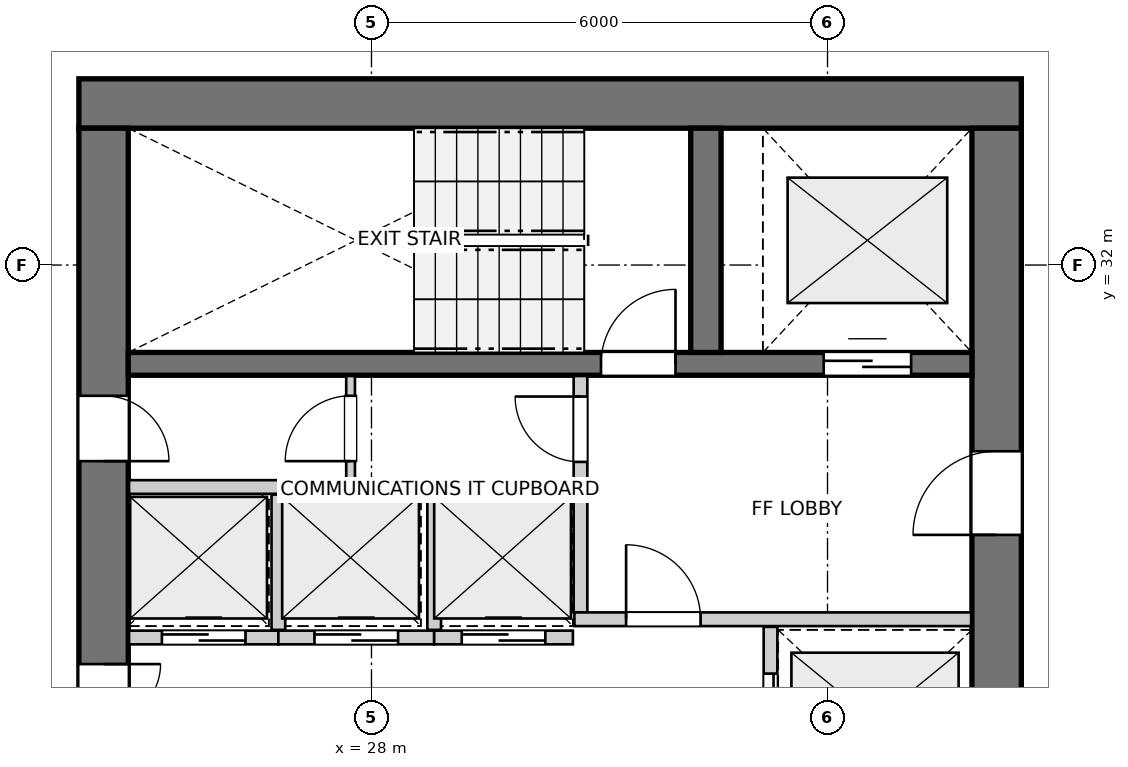
"""IFC4 building model, lengths in metres.
Left out: names, types, materials, properties, quantities, classifications, styles, units other than length and angle.
Written with IfcOpenShell. Run it as: python <this file> out.ifc"""

import sys

from ifc_helpers import new_model, si_unit, direction, frame, frame_2d, origin, place, context, subcontext, project, spatial, rectangle, extrude, source, transform, mapped, element, fill, save


model = new_model("IFC4")
c1 = context("Model", 3, precision=1e-05, world=origin(), true_north=direction((0.0, 1.0)))
c2 = subcontext(c1, "Body", "Model", "MODEL_VIEW")
j1 = project(units=[si_unit("LENGTHUNIT", "METRE"), si_unit("PLANEANGLEUNIT", "RADIAN")], contexts=[c1])
p1 = place(None, origin())
s1 = spatial("IfcSite", under=j1, at=p1, CompositionType="ELEMENT")
p2 = place(p1, origin())
s2 = spatial("IfcBuilding", under=s1, at=p2, CompositionType="ELEMENT")
p3 = place(p2, frame((0.0, 0.0, 145.8)))
s3 = spatial("IfcBuildingStorey", under=s2, at=p3, CompositionType="ELEMENT", Elevation=145.8)
p4 = place(p3, frame((36.55, 34.125, 0.0), z_axis=(0.0, 0.0, 1.0), x_axis=(-1.0, 0.0, 0.0)))
e1 = element("IfcWall", 1, at=p4, inside=s3, PredefinedType="SHEAR", context=c2, shape_type="SweptSolid", body=[
    extrude(rectangle(XDim=12.4, YDim=0.65, at=frame_2d((6.2, 0.0))), origin(), (0.0, 0.0, 1.0), 2.95),
])
p5 = place(p3, frame((24.475, 33.8, 0.0), z_axis=(0.0, 0.0, 1.0), x_axis=(0.0, -1.0, 0.0)))
e2 = element("IfcWall", 2, at=p5, inside=s3, PredefinedType="SHEAR", context=c2, shape_type="SweptSolid", body=[
    extrude(rectangle(XDim=15.6, YDim=0.65, at=frame_2d((7.8, 0.0))), origin(), (0.0, 0.0, 1.0), 2.95),
])
p6 = place(p5, frame((7.05, 0.0, 0.0)))
e3 = element("IfcOpeningElement", 3, at=p6, cuts=e2, PredefinedType="OPENING", context=c2, shape_type="SweptSolid", body=[
    extrude(rectangle(XDim=1.5, YDim=2.15, at=frame_2d((0.75, 1.075))), frame((0.0, 0.335, 0.0), z_axis=(0.0, -1.0, 0.0), x_axis=(1.0, 0.0, 0.0)), (0.0, 0.0, 1.0), 0.67),
])
p7 = place(p5, frame((3.52, 0.0, 0.0)))
e4 = element("IfcOpeningElement", 4, at=p7, cuts=e2, PredefinedType="OPENING", context=c2, shape_type="SweptSolid", body=[
    extrude(rectangle(XDim=0.86, YDim=2.05, at=frame_2d((0.43, 1.025))), frame((0.0, 0.335, 0.0), z_axis=(0.0, -1.0, 0.0), x_axis=(1.0, 0.0, 0.0)), (0.0, 0.0, 1.0), 0.67),
])
p8 = place(p5, frame((11.22, 0.0, 0.0)))
e5 = element("IfcOpeningElement", 5, at=p8, cuts=e2, PredefinedType="OPENING", context=c2, shape_type="SweptSolid", body=[
    extrude(rectangle(XDim=0.86, YDim=2.05, at=frame_2d((0.43, 1.025))), frame((0.0, 0.335, 0.0), z_axis=(0.0, -1.0, 0.0), x_axis=(1.0, 0.0, 0.0)), (0.0, 0.0, 1.0), 0.67),
])
p9 = place(p3, frame((36.225, 18.2, 0.0), z_axis=(0.0, 0.0, 1.0), x_axis=(0.0, 1.0, 0.0)))
e6 = element("IfcWall", 6, at=p9, inside=s3, PredefinedType="SHEAR", context=c2, shape_type="SweptSolid", body=[
    extrude(rectangle(XDim=15.6, YDim=0.65, at=frame_2d((7.8, 0.0))), origin(), (0.0, 0.0, 1.0), 2.95),
])
p10 = place(p9, frame((4.25, 0.0, 0.0)))
e7 = element("IfcOpeningElement", 7, at=p10, cuts=e6, PredefinedType="OPENING", context=c2, shape_type="SweptSolid", body=[
    extrude(rectangle(XDim=1.1, YDim=2.15, at=frame_2d((0.55, 1.075))), frame((0.0, 0.335, 0.0), z_axis=(0.0, -1.0, 0.0), x_axis=(1.0, 0.0, 0.0)), (0.0, 0.0, 1.0), 0.67),
])
p11 = place(p9, frame((10.25, 0.0, 0.0)))
e8 = element("IfcOpeningElement", 8, at=p11, cuts=e6, PredefinedType="OPENING", context=c2, shape_type="SweptSolid", body=[
    extrude(rectangle(XDim=1.1, YDim=2.15, at=frame_2d((0.55, 1.075))), frame((0.0, 0.335, 0.0), z_axis=(0.0, -1.0, 0.0), x_axis=(1.0, 0.0, 0.0)), (0.0, 0.0, 1.0), 0.67),
])
p12 = place(p3, frame((24.8, 30.7, 0.0), z_axis=(0.0, 0.0, 1.0), x_axis=(1.0, 0.0, 0.0)))
e9 = element("IfcWall", 9, at=p12, inside=s3, PredefinedType="SHEAR", context=c2, shape_type="SweptSolid", body=[
    extrude(rectangle(XDim=11.1, YDim=0.3, at=frame_2d((5.55, 0.0))), origin(), (0.0, 0.0, 1.0), 2.95),
])
p13 = place(p12, frame((6.22, 0.0, 0.0)))
e10 = element("IfcOpeningElement", 10, at=p13, cuts=e9, PredefinedType="OPENING", context=c2, shape_type="SweptSolid", body=[
    extrude(rectangle(XDim=0.98, YDim=2.15, at=frame_2d((0.49, 1.075))), frame((0.0, 0.16, 0.0), z_axis=(0.0, -1.0, 0.0), x_axis=(1.0, 0.0, 0.0)), (0.0, 0.0, 1.0), 0.32),
])
p14 = place(p12, frame((9.15, 0.0, 0.0)))
e11 = element("IfcOpeningElement", 11, at=p14, cuts=e9, PredefinedType="OPENING", context=c2, shape_type="SweptSolid", body=[
    extrude(rectangle(XDim=1.15, YDim=2.15, at=frame_2d((0.575, 1.075))), frame((0.0, 0.16, 0.0), z_axis=(0.0, -1.0, 0.0), x_axis=(1.0, 0.0, 0.0)), (0.0, 0.0, 1.0), 0.32),
])
p15 = place(p3, frame((32.4, 30.85, 0.0), z_axis=(0.0, 0.0, 1.0), x_axis=(0.0, 1.0, 0.0)))
e12 = element("IfcWall", 12, at=p15, inside=s3, PredefinedType="SHEAR", context=c2, shape_type="SweptSolid", body=[
    extrude(rectangle(XDim=2.95, YDim=0.4, at=frame_2d((1.475, 0.0))), origin(), (0.0, 0.0, 1.0), 2.95),
])
p16 = place(p3, frame((30.75, 27.43, 0.0), z_axis=(0.0, 0.0, 1.0), x_axis=(0.0, 1.0, 0.0)))
e13 = element("IfcWall", 13, at=p16, inside=s3, PredefinedType="PARTITIONING", context=c2, shape_type="SweptSolid", body=[
    extrude(rectangle(XDim=3.11, YDim=0.18, at=frame_2d((1.555, 0.0))), origin(), (0.0, 0.0, 1.0), 2.95),
])
p17 = place(p16, frame((1.98, 0.0, 0.0)))
e14 = element("IfcOpeningElement", 14, at=p17, cuts=e13, PredefinedType="OPENING", context=c2, shape_type="SweptSolid", body=[
    extrude(rectangle(XDim=0.86, YDim=2.05, at=frame_2d((0.43, 1.025))), frame((0.0, 0.1, 0.0), z_axis=(0.0, -1.0, 0.0), x_axis=(1.0, 0.0, 0.0)), (0.0, 0.0, 1.0), 0.2),
])
p18 = place(p3, frame((30.67, 27.34, 0.0), z_axis=(0.0, 0.0, 1.0), x_axis=(1.0, 0.0, 0.0)))
e15 = element("IfcWall", 15, at=p18, inside=s3, PredefinedType="PARTITIONING", context=c2, shape_type="SweptSolid", body=[
    extrude(rectangle(XDim=5.22, YDim=0.18, at=frame_2d((2.61, 0.0))), origin(), (0.0, 0.0, 1.0), 2.95),
])
p19 = place(p18, frame((0.68, 0.0, 0.0)))
e16 = element("IfcOpeningElement", 16, at=p19, cuts=e15, PredefinedType="OPENING", context=c2, shape_type="SweptSolid", body=[
    extrude(rectangle(XDim=0.98, YDim=2.15, at=frame_2d((0.49, 1.075))), frame((0.0, 0.1, 0.0), z_axis=(0.0, -1.0, 0.0), x_axis=(1.0, 0.0, 0.0)), (0.0, 0.0, 1.0), 0.2),
])
p20 = place(p3, frame((33.25, 24.76, 0.0), z_axis=(0.0, 0.0, 1.0), x_axis=(0.0, 1.0, 0.0)))
e17 = element("IfcWall", 17, at=p20, inside=s3, PredefinedType="PARTITIONING", context=c2, shape_type="SweptSolid", body=[
    extrude(rectangle(XDim=2.48, YDim=0.18, at=frame_2d((1.24, 0.0))), origin(), (0.0, 0.0, 1.0), 2.95),
])
p21 = place(p20, frame((0.615, 0.0, 0.0)))
e18 = element("IfcOpeningElement", 18, at=p21, cuts=e17, PredefinedType="OPENING", context=c2, shape_type="SweptSolid", body=[
    extrude(rectangle(XDim=1.25, YDim=2.15, at=frame_2d((0.625, 1.075))), frame((0.0, 0.1, 0.0), z_axis=(0.0, -1.0, 0.0), x_axis=(1.0, 0.0, 0.0)), (0.0, 0.0, 1.0), 0.2),
])
p22 = place(p3, frame((24.81, 29.08, 0.0), z_axis=(0.0, 0.0, 1.0), x_axis=(1.0, 0.0, 0.0)))
e19 = element("IfcWall", 19, at=p22, inside=s3, PredefinedType="PARTITIONING", context=c2, shape_type="SweptSolid", body=[
    extrude(rectangle(XDim=5.84, YDim=0.18, at=frame_2d((2.92, 0.0))), origin(), (0.0, 0.0, 1.0), 2.95),
])
p23 = place(p3, frame((24.81, 27.1, 0.0), z_axis=(0.0, 0.0, 1.0), x_axis=(1.0, 0.0, 0.0)))
e20 = element("IfcWall", 20, at=p23, inside=s3, PredefinedType="PARTITIONING", context=c2, shape_type="SweptSolid", body=[
    extrude(rectangle(XDim=1.965, YDim=0.18, at=frame_2d((0.982, 0.0))), origin(), (0.0, 0.0, 1.0), 2.95),
])
p24 = place(p23, frame((0.433, 0.0, 0.0)))
e21 = element("IfcOpeningElement", 21, at=p24, cuts=e20, PredefinedType="OPENING", context=c2, shape_type="SweptSolid", body=[
    extrude(rectangle(XDim=1.1, YDim=2.15, at=frame_2d((0.55, 1.075))), frame((0.0, 0.1, 0.0), z_axis=(0.0, -1.0, 0.0), x_axis=(1.0, 0.0, 0.0)), (0.0, 0.0, 1.0), 0.2),
])
p25 = place(p3, frame((26.775, 27.1, 0.0), z_axis=(0.0, 0.0, 1.0), x_axis=(1.0, 0.0, 0.0)))
e22 = element("IfcWall", 22, at=p25, inside=s3, PredefinedType="PARTITIONING", context=c2, shape_type="SweptSolid", body=[
    extrude(rectangle(XDim=2.05, YDim=0.18, at=frame_2d((1.025, 0.0))), origin(), (0.0, 0.0, 1.0), 2.95),
])
p26 = place(p25, frame((0.475, 0.0, 0.0)))
e23 = element("IfcOpeningElement", 23, at=p26, cuts=e22, PredefinedType="OPENING", context=c2, shape_type="SweptSolid", body=[
    extrude(rectangle(XDim=1.1, YDim=2.15, at=frame_2d((0.55, 1.075))), frame((0.0, 0.1, 0.0), z_axis=(0.0, -1.0, 0.0), x_axis=(1.0, 0.0, 0.0)), (0.0, 0.0, 1.0), 0.2),
])
p27 = place(p3, frame((26.775, 27.2, 0.0), z_axis=(0.0, 0.0, 1.0), x_axis=(0.0, 1.0, 0.0)))
e24 = element("IfcWall", 24, at=p27, inside=s3, PredefinedType="PARTITIONING", context=c2, shape_type="SweptSolid", body=[
    extrude(rectangle(XDim=1.78, YDim=0.18, at=frame_2d((0.89, 0.0))), origin(), (0.0, 0.0, 1.0), 2.95),
])
p28 = place(p3, frame((28.825, 27.1, 0.0), z_axis=(0.0, 0.0, 1.0), x_axis=(1.0, 0.0, 0.0)))
e25 = element("IfcWall", 25, at=p28, inside=s3, PredefinedType="PARTITIONING", context=c2, shape_type="SweptSolid", body=[
    extrude(rectangle(XDim=1.825, YDim=0.18, at=frame_2d((0.913, 0.0))), origin(), (0.0, 0.0, 1.0), 2.95),
])
p29 = place(p28, frame((0.363, 0.0, 0.0)))
e26 = element("IfcOpeningElement", 26, at=p29, cuts=e25, PredefinedType="OPENING", context=c2, shape_type="SweptSolid", body=[
    extrude(rectangle(XDim=1.1, YDim=2.15, at=frame_2d((0.55, 1.075))), frame((0.0, 0.1, 0.0), z_axis=(0.0, -1.0, 0.0), x_axis=(1.0, 0.0, 0.0)), (0.0, 0.0, 1.0), 0.2),
])
p30 = place(p3, frame((28.825, 27.2, 0.0), z_axis=(0.0, 0.0, 1.0), x_axis=(0.0, 1.0, 0.0)))
e27 = element("IfcWall", 27, at=p30, inside=s3, PredefinedType="PARTITIONING", context=c2, shape_type="SweptSolid", body=[
    extrude(rectangle(XDim=1.78, YDim=0.18, at=frame_2d((0.89, 0.0))), origin(), (0.0, 0.0, 1.0), 2.95),
])
p31 = place(p3, frame((27.725, 29.16, 0.0), z_axis=(0.0, 0.0, 1.0), x_axis=(0.0, 1.0, 0.0)))
e28 = element("IfcWall", 28, at=p31, inside=s3, PredefinedType="PARTITIONING", context=c2, shape_type="SweptSolid", body=[
    extrude(rectangle(XDim=1.38, YDim=0.115, at=frame_2d((0.69, 0.0))), origin(), (0.0, 0.0, 1.0), 2.95),
])
p32 = place(p31, frame((0.26, 0.0, 0.0)))
e29 = element("IfcOpeningElement", 29, at=p32, cuts=e28, PredefinedType="OPENING", context=c2, shape_type="SweptSolid", body=[
    extrude(rectangle(XDim=0.86, YDim=2.05, at=frame_2d((0.43, 1.025))), frame((0.0, 0.067, 0.0), z_axis=(0.0, -1.0, 0.0), x_axis=(1.0, 0.0, 0.0)), (0.0, 0.0, 1.0), 0.135),
])
m1 = source(origin(), c2, "Body", "SweptSolid", [
    extrude(rectangle(XDim=0.98, YDim=2.15, at=frame_2d((0.49, 1.075))), frame((0.0, 0.025, 0.0), z_axis=(0.0, -1.0, 0.0), x_axis=(1.0, 0.0, 0.0)), (0.0, 0.0, 1.0), 0.05),
])
p33 = place(p13, origin())
e30 = element("IfcDoor", 30, at=p33, inside=s3, OperationType="SINGLE_SWING_RIGHT", PredefinedType="DOOR", context=c2, shape_type="MappedRepresentation", body=[
    mapped(m1, transform((0.0, 0.0, 0.0), x_axis=(1.0, 0.0, 0.0), y_axis=(0.0, 1.0, 0.0), z_axis=(0.0, 0.0, 1.0), scale=1.0)),
])
fill(e10, e30)
m2 = source(origin(), c2, "Body", "SweptSolid", [
    extrude(rectangle(XDim=1.15, YDim=2.15, at=frame_2d((0.575, 1.075))), frame((0.0, 0.025, 0.0), z_axis=(0.0, -1.0, 0.0), x_axis=(1.0, 0.0, 0.0)), (0.0, 0.0, 1.0), 0.05),
])
p34 = place(p14, origin())
e31 = element("IfcDoor", 31, at=p34, inside=s3, OperationType="DOUBLE_DOOR_SLIDING", PredefinedType="DOOR", context=c2, shape_type="MappedRepresentation", body=[
    mapped(m2, transform((0.0, 0.0, 0.0), x_axis=(1.0, 0.0, 0.0), y_axis=(0.0, 1.0, 0.0), z_axis=(0.0, 0.0, 1.0), scale=1.0)),
])
fill(e11, e31)
m3 = source(origin(), c2, "Body", "SweptSolid", [
    extrude(rectangle(XDim=1.1, YDim=2.15, at=frame_2d((0.55, 1.075))), frame((0.0, 0.025, 0.0), z_axis=(0.0, -1.0, 0.0), x_axis=(1.0, 0.0, 0.0)), (0.0, 0.0, 1.0), 0.05),
])
p35 = place(p11, origin())
e32 = element("IfcDoor", 32, at=p35, inside=s3, OperationType="SINGLE_SWING_LEFT", PredefinedType="DOOR", context=c2, shape_type="MappedRepresentation", body=[
    mapped(m3, transform((0.0, 0.0, 0.0), x_axis=(1.0, 0.0, 0.0), y_axis=(0.0, 1.0, 0.0), z_axis=(0.0, 0.0, 1.0), scale=1.0)),
])
fill(e8, e32)
m4 = source(origin(), c2, "Body", "SweptSolid", [
    extrude(rectangle(XDim=1.5, YDim=2.15, at=frame_2d((0.75, 1.075))), frame((0.0, 0.025, 0.0), z_axis=(0.0, -1.0, 0.0), x_axis=(1.0, 0.0, 0.0)), (0.0, 0.0, 1.0), 0.05),
])
p36 = place(p6, origin())
e33 = element("IfcDoor", 33, at=p36, inside=s3, OperationType="DOUBLE_DOOR_SINGLE_SWING", PredefinedType="DOOR", context=c2, shape_type="MappedRepresentation", body=[
    mapped(m4, transform((0.0, 0.0, 0.0), x_axis=(1.0, 0.0, 0.0), y_axis=(0.0, 1.0, 0.0), z_axis=(0.0, 0.0, 1.0), scale=1.0)),
])
fill(e3, e33)
m5 = source(origin(), c2, "Body", "SweptSolid", [
    extrude(rectangle(XDim=0.86, YDim=2.05, at=frame_2d((0.43, 1.025))), frame((0.0, 0.025, 0.0), z_axis=(0.0, -1.0, 0.0), x_axis=(1.0, 0.0, 0.0)), (0.0, 0.0, 1.0), 0.05),
])
p37 = place(p7, origin())
e34 = element("IfcDoor", 34, at=p37, inside=s3, OperationType="SINGLE_SWING_RIGHT", PredefinedType="DOOR", context=c2, shape_type="MappedRepresentation", body=[
    mapped(m5, transform((0.0, 0.0, 0.0), x_axis=(1.0, 0.0, 0.0), y_axis=(0.0, 1.0, 0.0), z_axis=(0.0, 0.0, 1.0), scale=1.0)),
])
fill(e4, e34)
p38 = place(p17, origin())
e35 = element("IfcDoor", 35, at=p38, inside=s3, OperationType="SINGLE_SWING_RIGHT", PredefinedType="DOOR", context=c2, shape_type="MappedRepresentation", body=[
    mapped(m5, transform((0.0, 0.0, 0.0), x_axis=(1.0, 0.0, 0.0), y_axis=(0.0, 1.0, 0.0), z_axis=(0.0, 0.0, 1.0), scale=1.0)),
])
fill(e14, e35)
p39 = place(p19, origin())
e36 = element("IfcDoor", 36, at=p39, inside=s3, OperationType="SINGLE_SWING_LEFT", PredefinedType="DOOR", context=c2, shape_type="MappedRepresentation", body=[
    mapped(m1, transform((0.0, 0.0, 0.0), x_axis=(1.0, 0.0, 0.0), y_axis=(0.0, 1.0, 0.0), z_axis=(0.0, 0.0, 1.0), scale=1.0)),
])
fill(e16, e36)
m6 = source(origin(), c2, "Body", "SweptSolid", [
    extrude(rectangle(XDim=1.25, YDim=2.15, at=frame_2d((0.625, 1.075))), frame((0.0, 0.025, 0.0), z_axis=(0.0, -1.0, 0.0), x_axis=(1.0, 0.0, 0.0)), (0.0, 0.0, 1.0), 0.05),
])
p40 = place(p21, origin())
e37 = element("IfcDoor", 37, at=p40, inside=s3, OperationType="DOUBLE_DOOR_SLIDING", PredefinedType="DOOR", context=c2, shape_type="MappedRepresentation", body=[
    mapped(m6, transform((0.0, 0.0, 0.0), x_axis=(1.0, 0.0, 0.0), y_axis=(0.0, 1.0, 0.0), z_axis=(0.0, 0.0, 1.0), scale=1.0)),
])
fill(e18, e37)
p41 = place(p24, origin())
e38 = element("IfcDoor", 38, at=p41, inside=s3, OperationType="DOUBLE_DOOR_SLIDING", PredefinedType="DOOR", context=c2, shape_type="MappedRepresentation", body=[
    mapped(m3, transform((0.0, 0.0, 0.0), x_axis=(1.0, 0.0, 0.0), y_axis=(0.0, 1.0, 0.0), z_axis=(0.0, 0.0, 1.0), scale=1.0)),
])
fill(e21, e38)
p42 = place(p26, origin())
e39 = element("IfcDoor", 39, at=p42, inside=s3, OperationType="DOUBLE_DOOR_SLIDING", PredefinedType="DOOR", context=c2, shape_type="MappedRepresentation", body=[
    mapped(m3, transform((0.0, 0.0, 0.0), x_axis=(1.0, 0.0, 0.0), y_axis=(0.0, 1.0, 0.0), z_axis=(0.0, 0.0, 1.0), scale=1.0)),
])
fill(e23, e39)
p43 = place(p29, origin())
e40 = element("IfcDoor", 40, at=p43, inside=s3, OperationType="DOUBLE_DOOR_SLIDING", PredefinedType="DOOR", context=c2, shape_type="MappedRepresentation", body=[
    mapped(m3, transform((0.0, 0.0, 0.0), x_axis=(1.0, 0.0, 0.0), y_axis=(0.0, 1.0, 0.0), z_axis=(0.0, 0.0, 1.0), scale=1.0)),
])
fill(e26, e40)
p44 = place(p32, origin())
e41 = element("IfcDoor", 41, at=p44, inside=s3, OperationType="SINGLE_SWING_LEFT", PredefinedType="DOOR", context=c2, shape_type="MappedRepresentation", body=[
    mapped(m5, transform((0.0, 0.0, 0.0), x_axis=(1.0, 0.0, 0.0), y_axis=(0.0, 1.0, 0.0), z_axis=(0.0, 0.0, 1.0), scale=1.0)),
])
fill(e29, e41)
save(model, sys.argv[1])
